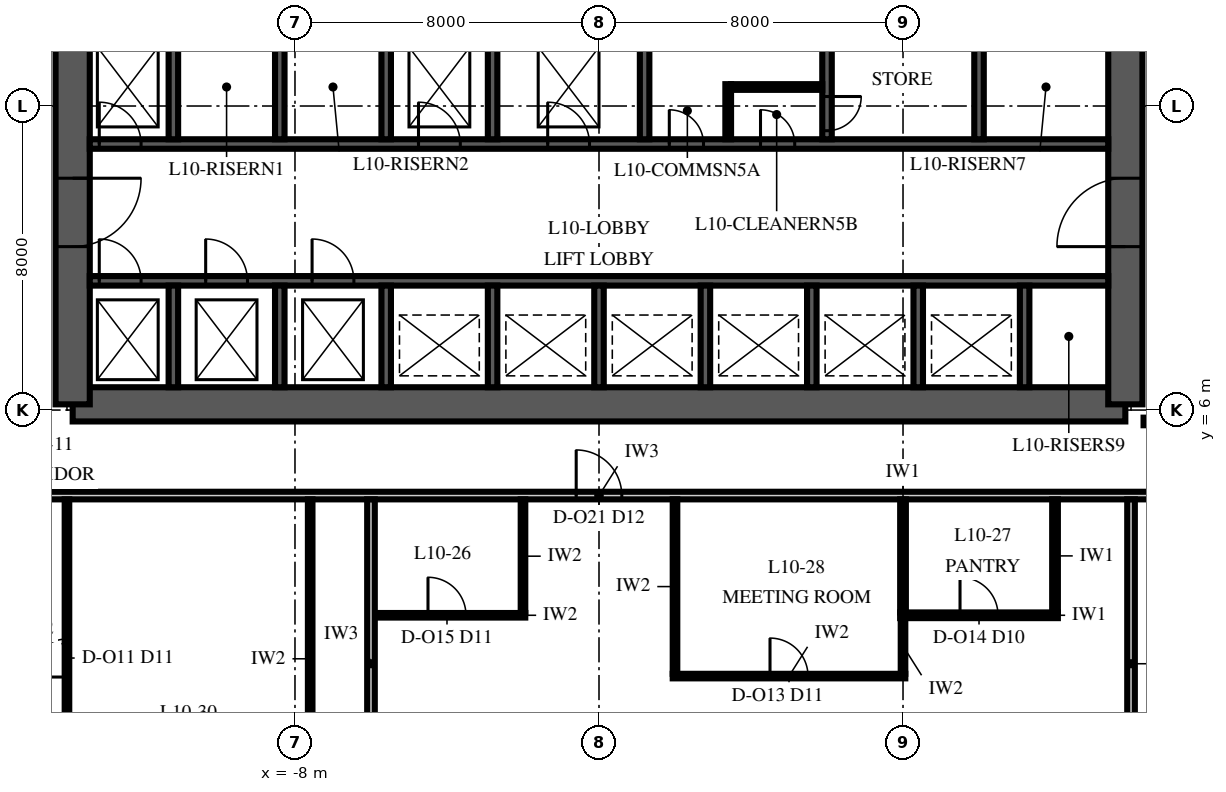
"""IFC4 building model, lengths in metres.
Left out: names, types, materials, properties, quantities, classifications, styles, units other than length and angle.
Written with IfcOpenShell. Run it as: python <this file> out.ifc"""

import sys

from ifc_helpers import new_model, si_unit, direction, frame, frame_2d, origin, place, context, subcontext, project, spatial, polyline, rectangle, outline, extrude, element, fill, save


model = new_model("IFC4")
c1 = context("Model", 3, precision=1e-05, world=origin(), true_north=direction((0.0, 1.0)))
c2 = subcontext(c1, "Body", "Model", "MODEL_VIEW")
j1 = project(units=[si_unit("LENGTHUNIT", "METRE"), si_unit("PLANEANGLEUNIT", "RADIAN")], contexts=[c1])
p1 = place(None, origin())
s1 = spatial("IfcSite", under=j1, at=p1, CompositionType="ELEMENT")
p2 = place(p1, origin())
s2 = spatial("IfcBuilding", under=s1, at=p2, CompositionType="ELEMENT")
p3 = place(p2, frame((0.0, 0.0, 52.0)))
s3 = spatial("IfcBuildingStorey", under=s2, at=p3, CompositionType="ELEMENT", Elevation=52.0)
p4 = place(p3, frame((-13.85, 6.15, 0.0), z_axis=(0.0, 0.0, 1.0), x_axis=(1.0, 0.0, 0.0)))
e1 = element("IfcWall", 1, at=p4, inside=s3, PredefinedType="SHEAR", context=c2, shape_type="SweptSolid", body=[
    extrude(rectangle(XDim=27.7, YDim=0.9, at=frame_2d((13.85, 0.0))), origin(), (0.0, 0.0, 1.0), 4.0),
])
p5 = place(p3, frame((13.85, 6.15, 0.0), z_axis=(0.0, 0.0, 1.0), x_axis=(0.0, 1.0, 0.0)))
e2 = element("IfcWall", 2, at=p5, inside=s3, PredefinedType="SHEAR", context=c2, shape_type="SweptSolid", body=[
    extrude(outline(polyline([(0.0, -0.45), (17.7, -0.45), (17.7, 0.0), (17.25, 0.0), (17.25, 0.45), (0.45, 0.45), (0.45, 0.0), (0.0, 0.0), (0.0, -0.45)])), origin(), (0.0, 0.0, 1.0), 4.0),
])
p6 = place(p5, frame((4.15, 0.0, 0.0)))
e3 = element("IfcOpeningElement", 3, at=p6, cuts=e2, PredefinedType="OPENING", context=c2, shape_type="SweptSolid", body=[
    extrude(rectangle(XDim=1.8, YDim=2.4, at=frame_2d((0.9, 1.2))), frame((0.0, 0.465, 0.0), z_axis=(0.0, -1.0, 0.0), x_axis=(1.0, 0.0, 0.0)), (0.0, 0.0, 1.0), 0.93),
])
p7 = place(p3, frame((-13.85, 23.85, 0.0), z_axis=(0.0, 0.0, 1.0), x_axis=(0.0, -1.0, 0.0)))
e4 = element("IfcWall", 4, at=p7, inside=s3, PredefinedType="SHEAR", context=c2, shape_type="SweptSolid", body=[
    extrude(outline(polyline([(0.0, -0.45), (17.7, -0.45), (17.7, 0.0), (17.25, 0.0), (17.25, 0.45), (0.45, 0.45), (0.45, 0.0), (0.0, 0.0), (0.0, -0.45)])), origin(), (0.0, 0.0, 1.0), 4.0),
])
p8 = place(p7, frame((11.75, 0.0, 0.0)))
e5 = element("IfcOpeningElement", 5, at=p8, cuts=e4, PredefinedType="OPENING", context=c2, shape_type="SweptSolid", body=[
    extrude(rectangle(XDim=1.8, YDim=2.4, at=frame_2d((0.9, 1.2))), frame((0.0, 0.465, 0.0), z_axis=(0.0, -1.0, 0.0), x_axis=(1.0, 0.0, 0.0)), (0.0, 0.0, 1.0), 0.93),
])
p9 = place(p3, frame((-13.4, 9.4, 0.0), z_axis=(0.0, 0.0, 1.0), x_axis=(1.0, 0.0, 0.0)))
e6 = element("IfcWall", 6, at=p9, inside=s3, PredefinedType="SHEAR", context=c2, shape_type="SweptSolid", body=[
    extrude(rectangle(XDim=26.8, YDim=0.25, at=frame_2d((13.4, 0.0))), origin(), (0.0, 0.0, 1.0), 4.0),
])
p10 = place(p9, frame((0.25, 0.0, 0.0)))
e7 = element("IfcOpeningElement", 7, at=p10, cuts=e6, PredefinedType="OPENING", context=c2, shape_type="SweptSolid", body=[
    extrude(rectangle(XDim=1.1, YDim=2.1, at=frame_2d((0.55, 1.05))), frame((0.0, 0.14, 0.0), z_axis=(0.0, -1.0, 0.0), x_axis=(1.0, 0.0, 0.0)), (0.0, 0.0, 1.0), 0.28),
])
p11 = place(p9, frame((3.05, 0.0, 0.0)))
e8 = element("IfcOpeningElement", 8, at=p11, cuts=e6, PredefinedType="OPENING", context=c2, shape_type="SweptSolid", body=[
    extrude(rectangle(XDim=1.1, YDim=2.1, at=frame_2d((0.55, 1.05))), frame((0.0, 0.14, 0.0), z_axis=(0.0, -1.0, 0.0), x_axis=(1.0, 0.0, 0.0)), (0.0, 0.0, 1.0), 0.28),
])
p12 = place(p9, frame((5.85, 0.0, 0.0)))
e9 = element("IfcOpeningElement", 9, at=p12, cuts=e6, PredefinedType="OPENING", context=c2, shape_type="SweptSolid", body=[
    extrude(rectangle(XDim=1.1, YDim=2.1, at=frame_2d((0.55, 1.05))), frame((0.0, 0.14, 0.0), z_axis=(0.0, -1.0, 0.0), x_axis=(1.0, 0.0, 0.0)), (0.0, 0.0, 1.0), 0.28),
])
p13 = place(p3, frame((-13.4, 13.0, 0.0), z_axis=(0.0, 0.0, 1.0), x_axis=(1.0, 0.0, 0.0)))
e10 = element("IfcWall", 10, at=p13, inside=s3, PredefinedType="SHEAR", context=c2, shape_type="SweptSolid", body=[
    extrude(rectangle(XDim=26.8, YDim=0.25, at=frame_2d((13.4, 0.0))), origin(), (0.0, 0.0, 1.0), 4.0),
])
p14 = place(p13, frame((0.25, 0.0, 0.0)))
e11 = element("IfcOpeningElement", 11, at=p14, cuts=e10, PredefinedType="OPENING", context=c2, shape_type="SweptSolid", body=[
    extrude(rectangle(XDim=1.1, YDim=2.1, at=frame_2d((0.55, 1.05))), frame((0.0, 0.14, 0.0), z_axis=(0.0, -1.0, 0.0), x_axis=(1.0, 0.0, 0.0)), (0.0, 0.0, 1.0), 0.28),
])
p15 = place(p13, frame((8.65, 0.0, 0.0)))
e12 = element("IfcOpeningElement", 12, at=p15, cuts=e10, PredefinedType="OPENING", context=c2, shape_type="SweptSolid", body=[
    extrude(rectangle(XDim=1.1, YDim=2.1, at=frame_2d((0.55, 1.05))), frame((0.0, 0.14, 0.0), z_axis=(0.0, -1.0, 0.0), x_axis=(1.0, 0.0, 0.0)), (0.0, 0.0, 1.0), 0.28),
])
p16 = place(p13, frame((12.05, 0.0, 0.0)))
e13 = element("IfcOpeningElement", 13, at=p16, cuts=e10, PredefinedType="OPENING", context=c2, shape_type="SweptSolid", body=[
    extrude(rectangle(XDim=1.1, YDim=2.1, at=frame_2d((0.55, 1.05))), frame((0.0, 0.14, 0.0), z_axis=(0.0, -1.0, 0.0), x_axis=(1.0, 0.0, 0.0)), (0.0, 0.0, 1.0), 0.28),
])
p17 = place(p13, frame((15.25, 0.0, 0.0)))
e14 = element("IfcOpeningElement", 14, at=p17, cuts=e10, PredefinedType="OPENING", context=c2, shape_type="SweptSolid", body=[
    extrude(rectangle(XDim=0.9, YDim=2.1, at=frame_2d((0.45, 1.05))), frame((0.0, 0.14, 0.0), z_axis=(0.0, -1.0, 0.0), x_axis=(1.0, 0.0, 0.0)), (0.0, 0.0, 1.0), 0.28),
])
p18 = place(p13, frame((17.65, 0.0, 0.0)))
e15 = element("IfcOpeningElement", 15, at=p18, cuts=e10, PredefinedType="OPENING", context=c2, shape_type="SweptSolid", body=[
    extrude(rectangle(XDim=0.9, YDim=2.1, at=frame_2d((0.45, 1.05))), frame((0.0, 0.14, 0.0), z_axis=(0.0, -1.0, 0.0), x_axis=(1.0, 0.0, 0.0)), (0.0, 0.0, 1.0), 0.28),
])
for number, where, z_axis, x_axis in (
    (16, (-11.2, 6.6, 0.0), (0.0, 0.0, 1.0), (0.0, 1.0, 0.0)),
    (17, (-8.4, 6.6, 0.0), (0.0, 0.0, 1.0), (0.0, 1.0, 0.0)),
    (18, (-5.6, 6.6, 0.0), (0.0, 0.0, 1.0), (0.0, 1.0, 0.0)),
    (19, (-2.8, 6.6, 0.0), (0.0, 0.0, 1.0), (0.0, 1.0, 0.0)),
    (20, (0.0, 6.6, 0.0), (0.0, 0.0, 1.0), (0.0, 1.0, 0.0)),
    (21, (2.8, 6.6, 0.0), (0.0, 0.0, 1.0), (0.0, 1.0, 0.0)),
    (22, (5.6, 6.6, 0.0), (0.0, 0.0, 1.0), (0.0, 1.0, 0.0)),
    (23, (8.4, 6.6, 0.0), (0.0, 0.0, 1.0), (0.0, 1.0, 0.0)),
    (24, (11.2, 6.6, 0.0), (0.0, 0.0, 1.0), (0.0, 1.0, 0.0)),
):
    element("IfcWall", number, at=place(p3, frame(where, z_axis=z_axis, x_axis=x_axis)), inside=s3, PredefinedType="SHEAR", context=c2, shape_type="SweptSolid", body=[
        extrude(rectangle(XDim=2.675, YDim=0.25, at=frame_2d((1.337, 0.0))), origin(), (0.0, 0.0, 1.0), 4.0),
    ])
for number, where, z_axis, x_axis in (
    (25, (-11.2, 13.125, 0.0), (0.0, 0.0, 1.0), (0.0, 1.0, 0.0)),
    (26, (-8.4, 13.125, 0.0), (0.0, 0.0, 1.0), (0.0, 1.0, 0.0)),
    (27, (-5.6, 13.125, 0.0), (0.0, 0.0, 1.0), (0.0, 1.0, 0.0)),
    (28, (-2.8, 13.125, 0.0), (0.0, 0.0, 1.0), (0.0, 1.0, 0.0)),
    (29, (1.2, 13.125, 0.0), (0.0, 0.0, 1.0), (0.0, 1.0, 0.0)),
):
    element("IfcWall", number, at=place(p3, frame(where, z_axis=z_axis, x_axis=x_axis)), inside=s3, PredefinedType="SHEAR", context=c2, shape_type="SweptSolid", body=[
        extrude(rectangle(XDim=2.75, YDim=0.25, at=frame_2d((1.375, 0.0))), origin(), (0.0, 0.0, 1.0), 4.0),
    ])
p19 = place(p3, frame((6.0, 13.125, 0.0), z_axis=(0.0, 0.0, 1.0), x_axis=(0.0, 1.0, 0.0)))
e30 = element("IfcWall", 30, at=p19, inside=s3, PredefinedType="SHEAR", context=c2, shape_type="SweptSolid", body=[
    extrude(rectangle(XDim=2.75, YDim=0.25, at=frame_2d((1.375, 0.0))), origin(), (0.0, 0.0, 1.0), 4.0),
])
p20 = place(p19, frame((0.225, 0.0, 0.0)))
e31 = element("IfcOpeningElement", 31, at=p20, cuts=e30, PredefinedType="OPENING", context=c2, shape_type="SweptSolid", body=[
    extrude(rectangle(XDim=0.9, YDim=2.1, at=frame_2d((0.45, 1.05))), frame((0.0, 0.14, 0.0), z_axis=(0.0, -1.0, 0.0), x_axis=(1.0, 0.0, 0.0)), (0.0, 0.0, 1.0), 0.28),
])
p21 = place(p3, frame((10.0, 13.125, 0.0), z_axis=(0.0, 0.0, 1.0), x_axis=(0.0, 1.0, 0.0)))
e32 = element("IfcWall", 32, at=p21, inside=s3, PredefinedType="SHEAR", context=c2, shape_type="SweptSolid", body=[
    extrude(rectangle(XDim=2.75, YDim=0.25, at=frame_2d((1.375, 0.0))), origin(), (0.0, 0.0, 1.0), 4.0),
])
p22 = place(p3, frame((3.4, 13.125, 0.0), z_axis=(0.0, 0.0, 1.0), x_axis=(0.0, 1.0, 0.0)))
e33 = element("IfcWall", 33, at=p22, inside=s3, PredefinedType="PARTITIONING", context=c2, shape_type="SweptSolid", body=[
    extrude(rectangle(XDim=1.45, YDim=0.15, at=frame_2d((0.725, 0.0))), origin(), (0.0, 0.0, 1.0), 3.85),
])
p23 = place(p3, frame((3.475, 14.5, 0.0), z_axis=(0.0, 0.0, 1.0), x_axis=(1.0, 0.0, 0.0)))
e34 = element("IfcWall", 34, at=p23, inside=s3, PredefinedType="PARTITIONING", context=c2, shape_type="SweptSolid", body=[
    extrude(rectangle(XDim=2.4, YDim=0.15, at=frame_2d((1.2, 0.0))), origin(), (0.0, 0.0, 1.0), 3.85),
])
p24 = place(p3, frame((1.94, -1.0, 0.0), z_axis=(0.0, 0.0, 1.0), x_axis=(1.0, 0.0, 0.0)))
e35 = element("IfcWall", 35, at=p24, inside=s3, PredefinedType="PARTITIONING", context=c2, shape_type="SweptSolid", body=[
    extrude(rectangle(XDim=6.12, YDim=0.12, at=frame_2d((3.06, 0.0))), origin(), (0.0, 0.0, 1.0), 3.25),
])
p25 = place(p24, frame((2.56, 0.0, 0.0)))
e36 = element("IfcOpeningElement", 36, at=p25, cuts=e35, PredefinedType="OPENING", context=c2, shape_type="SweptSolid", body=[
    extrude(rectangle(XDim=1.0, YDim=2.4, at=frame_2d((0.5, 1.2))), frame((0.0, 0.075, 0.0), z_axis=(0.0, -1.0, 0.0), x_axis=(1.0, 0.0, 0.0)), (0.0, 0.0, 1.0), 0.15),
])
p26 = place(p3, frame((-5.9, 0.6, 0.0), z_axis=(0.0, 0.0, 1.0), x_axis=(1.0, 0.0, 0.0)))
e37 = element("IfcWall", 37, at=p26, inside=s3, PredefinedType="PARTITIONING", context=c2, shape_type="SweptSolid", body=[
    extrude(rectangle(XDim=3.96, YDim=0.12, at=frame_2d((1.98, 0.0))), origin(), (0.0, 0.0, 1.0), 3.25),
])
p27 = place(p26, frame((1.4, 0.0, 0.0)))
e38 = element("IfcOpeningElement", 38, at=p27, cuts=e37, PredefinedType="OPENING", context=c2, shape_type="SweptSolid", body=[
    extrude(rectangle(XDim=1.0, YDim=2.4, at=frame_2d((0.5, 1.2))), frame((0.0, 0.075, 0.0), z_axis=(0.0, -1.0, 0.0), x_axis=(1.0, 0.0, 0.0)), (0.0, 0.0, 1.0), 0.15),
])
p28 = place(p3, frame((7.925, 0.6, 0.0), z_axis=(0.0, 0.0, 1.0), x_axis=(1.0, 0.0, 0.0)))
e39 = element("IfcWall", 39, at=p28, inside=s3, PredefinedType="PARTITIONING", context=c2, shape_type="SweptSolid", body=[
    extrude(rectangle(XDim=4.15, YDim=0.15, at=frame_2d((2.075, 0.0))), origin(), (0.0, 0.0, 1.0), 3.25),
])
p29 = place(p28, frame((1.575, 0.0, 0.0)))
e40 = element("IfcOpeningElement", 40, at=p29, cuts=e39, PredefinedType="OPENING", context=c2, shape_type="SweptSolid", body=[
    extrude(rectangle(XDim=1.0, YDim=2.3, at=frame_2d((0.5, 1.15))), frame((0.0, 0.09, 0.0), z_axis=(0.0, -1.0, 0.0), x_axis=(1.0, 0.0, 0.0)), (0.0, 0.0, 1.0), 0.18),
])
p30 = place(p3, frame((-16.35, 3.75, 0.0), z_axis=(0.0, 0.0, 1.0), x_axis=(1.0, 0.0, 0.0)))
e41 = element("IfcWall", 41, at=p30, inside=s3, PredefinedType="PARTITIONING", context=c2, shape_type="SweptSolid", body=[
    extrude(rectangle(XDim=32.7, YDim=0.2, at=frame_2d((16.35, 0.0))), origin(), (0.0, 0.0, 1.0), 3.25),
])
p31 = place(p30, frame((15.75, 0.0, 0.0)))
e42 = element("IfcOpeningElement", 42, at=p31, cuts=e41, PredefinedType="OPENING", context=c2, shape_type="SweptSolid", body=[
    extrude(rectangle(XDim=1.2, YDim=2.4, at=frame_2d((0.6, 1.2))), frame((0.0, 0.115, 0.0), z_axis=(0.0, -1.0, 0.0), x_axis=(1.0, 0.0, 0.0)), (0.0, 0.0, 1.0), 0.23),
])
p32 = place(p3, frame((14.33, 5.7, 0.0), z_axis=(0.0, 0.0, 1.0), x_axis=(1.0, 0.0, 0.0)))
e43 = element("IfcWall", 43, at=p32, inside=s3, PredefinedType="PARTITIONING", context=c2, shape_type="SweptSolid", body=[
    extrude(rectangle(XDim=2.02, YDim=0.2, at=frame_2d((1.01, 0.0))), origin(), (0.0, 0.0, 1.0), 3.85),
])
p33 = place(p3, frame((-14.0, -4.74, 0.0), z_axis=(0.0, 0.0, 1.0), x_axis=(0.0, 1.0, 0.0)))
e44 = element("IfcWall", 44, at=p33, inside=s3, PredefinedType="PARTITIONING", context=c2, shape_type="SweptSolid", body=[
    extrude(rectangle(XDim=8.39, YDim=0.12, at=frame_2d((4.195, 0.0))), origin(), (0.0, 0.0, 1.0), 3.25),
])
p34 = place(p33, frame((3.715, 0.0, 0.0)))
e45 = element("IfcOpeningElement", 45, at=p34, cuts=e44, PredefinedType="OPENING", context=c2, shape_type="SweptSolid", body=[
    extrude(rectangle(XDim=1.0, YDim=2.4, at=frame_2d((0.5, 1.2))), frame((0.0, 0.075, 0.0), z_axis=(0.0, -1.0, 0.0), x_axis=(1.0, 0.0, 0.0)), (0.0, 0.0, 1.0), 0.15),
])
p35 = place(p3, frame((-7.6, -4.74, 0.0), z_axis=(0.0, 0.0, 1.0), x_axis=(0.0, 1.0, 0.0)))
e46 = element("IfcWall", 46, at=p35, inside=s3, PredefinedType="PARTITIONING", context=c2, shape_type="SweptSolid", body=[
    extrude(rectangle(XDim=8.39, YDim=0.12, at=frame_2d((4.195, 0.0))), origin(), (0.0, 0.0, 1.0), 3.85),
])
p36 = place(p3, frame((-6.0, -5.0, 0.0), z_axis=(0.0, 0.0, 1.0), x_axis=(0.0, 1.0, 0.0)))
e47 = element("IfcWall", 47, at=p36, inside=s3, PredefinedType="PARTITIONING", context=c2, shape_type="SweptSolid", body=[
    extrude(rectangle(XDim=8.65, YDim=0.2, at=frame_2d((4.325, 0.0))), origin(), (0.0, 0.0, 1.0), 3.25),
])
p37 = place(p3, frame((-2.0, 0.66, 0.0), z_axis=(0.0, 0.0, 1.0), x_axis=(0.0, 1.0, 0.0)))
e48 = element("IfcWall", 48, at=p37, inside=s3, PredefinedType="PARTITIONING", context=c2, shape_type="SweptSolid", body=[
    extrude(rectangle(XDim=2.99, YDim=0.12, at=frame_2d((1.495, 0.0))), origin(), (0.0, 0.0, 1.0), 3.85),
])
p38 = place(p3, frame((2.0, -0.94, 0.0), z_axis=(0.0, 0.0, 1.0), x_axis=(0.0, 1.0, 0.0)))
e49 = element("IfcWall", 49, at=p38, inside=s3, PredefinedType="PARTITIONING", context=c2, shape_type="SweptSolid", body=[
    extrude(rectangle(XDim=4.59, YDim=0.12, at=frame_2d((2.295, 0.0))), origin(), (0.0, 0.0, 1.0), 3.85),
])
p39 = place(p3, frame((8.0, -0.94, 0.0), z_axis=(0.0, 0.0, 1.0), x_axis=(0.0, 1.0, 0.0)))
e50 = element("IfcWall", 50, at=p39, inside=s3, PredefinedType="PARTITIONING", context=c2, shape_type="SweptSolid", body=[
    extrude(rectangle(XDim=1.465, YDim=0.12, at=frame_2d((0.732, 0.0))), origin(), (0.0, 0.0, 1.0), 3.85),
])
for number, where, z_axis, x_axis in (
    (51, (8.0, 0.675, 0.0), (0.0, 0.0, 1.0), (0.0, 1.0, 0.0)),
    (52, (12.0, 0.675, 0.0), (0.0, 0.0, 1.0), (0.0, 1.0, 0.0)),
):
    element("IfcWall", number, at=place(p3, frame(where, z_axis=z_axis, x_axis=x_axis)), inside=s3, PredefinedType="PARTITIONING", context=c2, shape_type="SweptSolid", body=[
        extrude(rectangle(XDim=2.975, YDim=0.15, at=frame_2d((1.487, 0.0))), origin(), (0.0, 0.0, 1.0), 3.85),
    ])
p40 = place(p3, frame((14.0, -5.0, 0.0), z_axis=(0.0, 0.0, 1.0), x_axis=(0.0, 1.0, 0.0)))
e53 = element("IfcWall", 53, at=p40, inside=s3, PredefinedType="PARTITIONING", context=c2, shape_type="SweptSolid", body=[
    extrude(rectangle(XDim=8.65, YDim=0.2, at=frame_2d((4.325, 0.0))), origin(), (0.0, 0.0, 1.0), 3.25),
])
p41 = place(p6, origin())
e54 = element("IfcDoor", 54, at=p41, inside=s3, OperationType="DOUBLE_DOOR_SINGLE_SWING", PredefinedType="DOOR", context=c2, shape_type="SweptSolid", body=[
    extrude(rectangle(XDim=1.8, YDim=2.4, at=frame_2d((0.9, 1.2))), frame((0.0, 0.45, 0.0), z_axis=(0.0, -1.0, 0.0), x_axis=(1.0, 0.0, 0.0)), (0.0, 0.0, 1.0), 0.899),
])
fill(e3, e54)
p42 = place(p8, origin())
e55 = element("IfcDoor", 55, at=p42, inside=s3, OperationType="DOUBLE_DOOR_SINGLE_SWING", PredefinedType="DOOR", context=c2, shape_type="SweptSolid", body=[
    extrude(rectangle(XDim=1.8, YDim=2.4, at=frame_2d((0.9, 1.2))), frame((0.0, 0.45, 0.0), z_axis=(0.0, -1.0, 0.0), x_axis=(1.0, 0.0, 0.0)), (0.0, 0.0, 1.0), 0.899),
])
fill(e5, e55)
p43 = place(p10, origin())
e56 = element("IfcDoor", 56, at=p43, inside=s3, OperationType="SLIDING_TO_LEFT", PredefinedType="DOOR", context=c2, shape_type="SweptSolid", body=[
    extrude(rectangle(XDim=1.1, YDim=2.1, at=frame_2d((0.55, 1.05))), frame((0.0, 0.125, 0.0), z_axis=(0.0, -1.0, 0.0), x_axis=(1.0, 0.0, 0.0)), (0.0, 0.0, 1.0), 0.25),
])
fill(e7, e56)
p44 = place(p11, origin())
e57 = element("IfcDoor", 57, at=p44, inside=s3, OperationType="SLIDING_TO_LEFT", PredefinedType="DOOR", context=c2, shape_type="SweptSolid", body=[
    extrude(rectangle(XDim=1.1, YDim=2.1, at=frame_2d((0.55, 1.05))), frame((0.0, 0.125, 0.0), z_axis=(0.0, -1.0, 0.0), x_axis=(1.0, 0.0, 0.0)), (0.0, 0.0, 1.0), 0.25),
])
fill(e8, e57)
p45 = place(p12, origin())
e58 = element("IfcDoor", 58, at=p45, inside=s3, OperationType="SLIDING_TO_LEFT", PredefinedType="DOOR", context=c2, shape_type="SweptSolid", body=[
    extrude(rectangle(XDim=1.1, YDim=2.1, at=frame_2d((0.55, 1.05))), frame((0.0, 0.125, 0.0), z_axis=(0.0, -1.0, 0.0), x_axis=(1.0, 0.0, 0.0)), (0.0, 0.0, 1.0), 0.25),
])
fill(e9, e58)
p46 = place(p14, origin())
e59 = element("IfcDoor", 59, at=p46, inside=s3, OperationType="SLIDING_TO_LEFT", PredefinedType="DOOR", context=c2, shape_type="SweptSolid", body=[
    extrude(rectangle(XDim=1.1, YDim=2.1, at=frame_2d((0.55, 1.05))), frame((0.0, 0.125, 0.0), z_axis=(0.0, -1.0, 0.0), x_axis=(1.0, 0.0, 0.0)), (0.0, 0.0, 1.0), 0.25),
])
fill(e11, e59)
p47 = place(p15, origin())
e60 = element("IfcDoor", 60, at=p47, inside=s3, OperationType="SLIDING_TO_LEFT", PredefinedType="DOOR", context=c2, shape_type="SweptSolid", body=[
    extrude(rectangle(XDim=1.1, YDim=2.1, at=frame_2d((0.55, 1.05))), frame((0.0, 0.125, 0.0), z_axis=(0.0, -1.0, 0.0), x_axis=(1.0, 0.0, 0.0)), (0.0, 0.0, 1.0), 0.25),
])
fill(e12, e60)
p48 = place(p16, origin())
e61 = element("IfcDoor", 61, at=p48, inside=s3, OperationType="SLIDING_TO_LEFT", PredefinedType="DOOR", context=c2, shape_type="SweptSolid", body=[
    extrude(rectangle(XDim=1.1, YDim=2.1, at=frame_2d((0.55, 1.05))), frame((0.0, 0.125, 0.0), z_axis=(0.0, -1.0, 0.0), x_axis=(1.0, 0.0, 0.0)), (0.0, 0.0, 1.0), 0.25),
])
fill(e13, e61)
p49 = place(p17, origin())
e62 = element("IfcDoor", 62, at=p49, inside=s3, OperationType="SINGLE_SWING_LEFT", PredefinedType="DOOR", context=c2, shape_type="SweptSolid", body=[
    extrude(rectangle(XDim=0.9, YDim=2.1, at=frame_2d((0.45, 1.05))), frame((0.0, 0.125, 0.0), z_axis=(0.0, -1.0, 0.0), x_axis=(1.0, 0.0, 0.0)), (0.0, 0.0, 1.0), 0.25),
])
fill(e14, e62)
p50 = place(p18, origin())
e63 = element("IfcDoor", 63, at=p50, inside=s3, OperationType="SINGLE_SWING_LEFT", PredefinedType="DOOR", context=c2, shape_type="SweptSolid", body=[
    extrude(rectangle(XDim=0.9, YDim=2.1, at=frame_2d((0.45, 1.05))), frame((0.0, 0.125, 0.0), z_axis=(0.0, -1.0, 0.0), x_axis=(1.0, 0.0, 0.0)), (0.0, 0.0, 1.0), 0.25),
])
fill(e15, e63)
p51 = place(p20, frame((0.9, 0.0, 0.0), z_axis=(0.0, 0.0, 1.0), x_axis=(-1.0, 0.0, 0.0)))
e64 = element("IfcDoor", 64, at=p51, inside=s3, OperationType="SINGLE_SWING_LEFT", PredefinedType="DOOR", context=c2, shape_type="SweptSolid", body=[
    extrude(rectangle(XDim=0.9, YDim=2.1, at=frame_2d((0.45, 1.05))), frame((0.0, 0.125, 0.0), z_axis=(0.0, -1.0, 0.0), x_axis=(1.0, 0.0, 0.0)), (0.0, 0.0, 1.0), 0.25),
])
fill(e31, e64)
p52 = place(p34, origin())
e65 = element("IfcDoor", 65, at=p52, inside=s3, OperationType="SINGLE_SWING_RIGHT", PredefinedType="DOOR", context=c2, shape_type="SweptSolid", body=[
    extrude(rectangle(XDim=1.0, YDim=2.4, at=frame_2d((0.5, 1.2))), frame((0.0, 0.06, 0.0), z_axis=(0.0, -1.0, 0.0), x_axis=(1.0, 0.0, 0.0)), (0.0, 0.0, 1.0), 0.12),
])
fill(e45, e65)
p53 = place(p25, origin())
e66 = element("IfcDoor", 66, at=p53, inside=s3, OperationType="SINGLE_SWING_RIGHT", PredefinedType="DOOR", context=c2, shape_type="SweptSolid", body=[
    extrude(rectangle(XDim=1.0, YDim=2.4, at=frame_2d((0.5, 1.2))), frame((0.0, 0.06, 0.0), z_axis=(0.0, -1.0, 0.0), x_axis=(1.0, 0.0, 0.0)), (0.0, 0.0, 1.0), 0.12),
])
fill(e36, e66)
p54 = place(p29, origin())
e67 = element("IfcDoor", 67, at=p54, inside=s3, OperationType="SINGLE_SWING_LEFT", PredefinedType="DOOR", context=c2, shape_type="SweptSolid", body=[
    extrude(rectangle(XDim=1.0, YDim=2.3, at=frame_2d((0.5, 1.15))), frame((0.0, 0.075, 0.0), z_axis=(0.0, -1.0, 0.0), x_axis=(1.0, 0.0, 0.0)), (0.0, 0.0, 1.0), 0.149),
])
fill(e40, e67)
p55 = place(p27, origin())
e68 = element("IfcDoor", 68, at=p55, inside=s3, OperationType="SINGLE_SWING_RIGHT", PredefinedType="DOOR", context=c2, shape_type="SweptSolid", body=[
    extrude(rectangle(XDim=1.0, YDim=2.4, at=frame_2d((0.5, 1.2))), frame((0.0, 0.06, 0.0), z_axis=(0.0, -1.0, 0.0), x_axis=(1.0, 0.0, 0.0)), (0.0, 0.0, 1.0), 0.12),
])
fill(e38, e68)
p56 = place(p31, origin())
e69 = element("IfcDoor", 69, at=p56, inside=s3, OperationType="SINGLE_SWING_LEFT", PredefinedType="DOOR", context=c2, shape_type="SweptSolid", body=[
    extrude(rectangle(XDim=1.2, YDim=2.4, at=frame_2d((0.6, 1.2))), frame((0.0, 0.1, 0.0), z_axis=(0.0, -1.0, 0.0), x_axis=(1.0, 0.0, 0.0)), (0.0, 0.0, 1.0), 0.199),
])
fill(e42, e69)
save(model, sys.argv[1])
